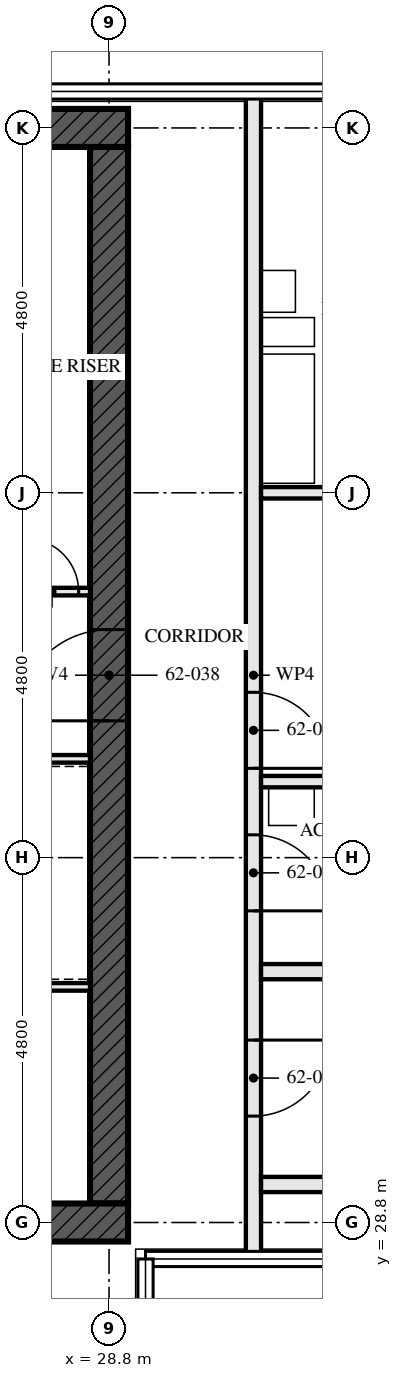
"""IFC4 building model, lengths in metres.
Left out: names, types, materials, properties, quantities, classifications, styles, units other than length and angle.
Written with IfcOpenShell. Run it as: python <this file> out.ifc"""

import sys

from ifc_helpers import new_model, si_unit, direction, frame, frame_2d, origin, place, context, subcontext, project, spatial, rectangle, extrude, element, fill, save


model = new_model("IFC4")
c1 = context("Model", 3, precision=1e-05, world=origin(), true_north=direction((0.0, 1.0)))
c2 = subcontext(c1, "Body", "Model", "MODEL_VIEW")
j1 = project(units=[si_unit("LENGTHUNIT", "METRE"), si_unit("PLANEANGLEUNIT", "RADIAN")], contexts=[c1])
p1 = place(None, origin())
s1 = spatial("IfcSite", under=j1, at=p1, CompositionType="ELEMENT")
p2 = place(p1, origin())
s2 = spatial("IfcBuilding", under=s1, at=p2, CompositionType="ELEMENT")
p3 = place(p2, frame((0.0, 0.0, 226.0)))
s3 = spatial("IfcBuildingStorey", under=s2, at=p3, CompositionType="ELEMENT", Elevation=226.0)
p4 = place(p3, frame((14.15, 28.8, -0.17), z_axis=(0.0, 0.0, 1.0), x_axis=(1.0, 0.0, 0.0)))
e1 = element("IfcWall", 1, at=p4, inside=s3, PredefinedType="SHEAR", context=c2, shape_type="SweptSolid", body=[
    extrude(rectangle(XDim=14.9, YDim=0.5, at=frame_2d((7.45, 0.0))), origin(), (0.0, 0.0, 1.0), 3.5),
])
p5 = place(p4, frame((6.85, 0.0, 0.17)))
e2 = element("IfcOpeningElement", 2, at=p5, cuts=e1, PredefinedType="OPENING", context=c2, shape_type="SweptSolid", body=[
    extrude(rectangle(XDim=1.2, YDim=2.1, at=frame_2d((0.6, 1.05))), frame((0.0, 0.26, 0.0), z_axis=(0.0, -1.0, 0.0), x_axis=(1.0, 0.0, 0.0)), (0.0, 0.0, 1.0), 0.521),
])
p6 = place(p3, frame((29.05, 43.2, -0.17), z_axis=(0.0, 0.0, 1.0), x_axis=(-1.0, 0.0, 0.0)))
e3 = element("IfcWall", 3, at=p6, inside=s3, PredefinedType="SHEAR", context=c2, shape_type="SweptSolid", body=[
    extrude(rectangle(XDim=14.9, YDim=0.5, at=frame_2d((7.45, 0.0))), origin(), (0.0, 0.0, 1.0), 3.5),
])
p7 = place(p3, frame((28.8, 29.05, -0.17), z_axis=(0.0, 0.0, 1.0), x_axis=(0.0, 1.0, 0.0)))
e4 = element("IfcWall", 4, at=p7, inside=s3, PredefinedType="SHEAR", context=c2, shape_type="SweptSolid", body=[
    extrude(rectangle(XDim=13.9, YDim=0.5, at=frame_2d((6.95, 0.0))), origin(), (0.0, 0.0, 1.0), 3.5),
])
p8 = place(p7, frame((6.35, 0.0, 0.17)))
e5 = element("IfcOpeningElement", 5, at=p8, cuts=e4, PredefinedType="OPENING", context=c2, shape_type="SweptSolid", body=[
    extrude(rectangle(XDim=1.2, YDim=2.1, at=frame_2d((0.6, 1.05))), frame((0.0, 0.26, 0.0), z_axis=(0.0, -1.0, 0.0), x_axis=(1.0, 0.0, 0.0)), (0.0, 0.0, 1.0), 0.521),
])
for number, where, z_axis, x_axis in (
    (6, (35.5, 29.3, 0.0), (0.0, 0.0, 1.0), (-1.0, 0.0, 0.0)),
    (7, (35.5, 32.1, 0.0), (0.0, 0.0, 1.0), (-1.0, 0.0, 0.0)),
):
    element("IfcWall", number, at=place(p3, frame(where, z_axis=z_axis, x_axis=x_axis)), inside=s3, PredefinedType="SOLIDWALL", context=c2, shape_type="SweptSolid", body=[
        extrude(rectangle(XDim=4.7, YDim=0.2, at=frame_2d((2.35, 0.0))), origin(), (0.0, 0.0, 1.0), 2.99),
    ])
p9 = place(p3, frame((33.8, 34.6, 0.0), z_axis=(0.0, 0.0, 1.0), x_axis=(-1.0, 0.0, 0.0)))
e8 = element("IfcWall", 8, at=p9, inside=s3, PredefinedType="PARTITIONING", context=c2, shape_type="SweptSolid", body=[
    extrude(rectangle(XDim=3.0, YDim=0.15, at=frame_2d((1.5, 0.0))), origin(), (0.0, 0.0, 1.0), 3.33),
])
p10 = place(p3, frame((33.8, 38.4, 0.0), z_axis=(0.0, 0.0, 1.0), x_axis=(-1.0, 0.0, 0.0)))
e9 = element("IfcWall", 9, at=p10, inside=s3, PredefinedType="PARTITIONING", context=c2, shape_type="SweptSolid", body=[
    extrude(rectangle(XDim=3.0, YDim=0.15, at=frame_2d((1.5, 0.0))), origin(), (0.0, 0.0, 1.0), 2.55),
])
p11 = place(p10, frame((1.05, 0.0, 0.0)))
e10 = element("IfcOpeningElement", 10, at=p11, cuts=e9, PredefinedType="OPENING", context=c2, shape_type="SweptSolid", body=[
    extrude(rectangle(XDim=0.9, YDim=2.1, at=frame_2d((0.45, 1.05))), frame((0.0, 0.085, 0.0), z_axis=(0.0, -1.0, 0.0), x_axis=(1.0, 0.0, 0.0)), (0.0, 0.0, 1.0), 0.171),
])
p12 = place(p3, frame((30.7, 28.345, 0.0), z_axis=(0.0, 0.0, 1.0), x_axis=(0.0, 1.0, 0.0)))
e11 = element("IfcWall", 11, at=p12, inside=s3, PredefinedType="PARTITIONING", context=c2, shape_type="SweptSolid", body=[
    extrude(rectangle(XDim=15.31, YDim=0.2, at=frame_2d((7.655, 0.0))), origin(), (0.0, 0.0, 1.0), 2.32),
])
p13 = place(p12, frame((1.855, 0.0, 0.0)))
e12 = element("IfcOpeningElement", 12, at=p13, cuts=e11, PredefinedType="OPENING", context=c2, shape_type="SweptSolid", body=[
    extrude(rectangle(XDim=1.0, YDim=2.1, at=frame_2d((0.5, 1.05))), frame((0.0, 0.111, 0.0), z_axis=(0.0, -1.0, 0.0), x_axis=(1.0, 0.0, 0.0)), (0.0, 0.0, 1.0), 0.221),
])
p14 = place(p12, frame((4.555, 0.0, 0.0)))
e13 = element("IfcOpeningElement", 13, at=p14, cuts=e11, PredefinedType="OPENING", context=c2, shape_type="SweptSolid", body=[
    extrude(rectangle(XDim=1.0, YDim=2.1, at=frame_2d((0.5, 1.05))), frame((0.0, 0.111, 0.0), z_axis=(0.0, -1.0, 0.0), x_axis=(1.0, 0.0, 0.0)), (0.0, 0.0, 1.0), 0.221),
])
p15 = place(p12, frame((6.43, 0.0, 0.0)))
e14 = element("IfcOpeningElement", 14, at=p15, cuts=e11, PredefinedType="OPENING", context=c2, shape_type="SweptSolid", body=[
    extrude(rectangle(XDim=1.0, YDim=2.1, at=frame_2d((0.5, 1.05))), frame((0.0, 0.111, 0.0), z_axis=(0.0, -1.0, 0.0), x_axis=(1.0, 0.0, 0.0)), (0.0, 0.0, 1.0), 0.221),
])
p16 = place(p3, frame((23.05, 34.9, 0.0), z_axis=(0.0, 0.0, 1.0), x_axis=(1.0, 0.0, 0.0)))
e15 = element("IfcWall", 15, at=p16, inside=s3, PredefinedType="SOLIDWALL", context=c2, shape_type="SweptSolid", body=[
    extrude(rectangle(XDim=5.5, YDim=0.1, at=frame_2d((2.75, 0.0))), origin(), (0.0, 0.0, 1.0), 3.33),
])
p17 = place(p16, frame((0.85, 0.0, 0.0)))
e16 = element("IfcOpeningElement", 16, at=p17, cuts=e15, PredefinedType="OPENING", context=c2, shape_type="SweptSolid", body=[
    extrude(rectangle(XDim=1.0, YDim=2.1, at=frame_2d((0.5, 1.05))), frame((0.0, 0.061, 0.0), z_axis=(0.0, -1.0, 0.0), x_axis=(1.0, 0.0, 0.0)), (0.0, 0.0, 1.0), 0.121),
])
p18 = place(p16, frame((3.625, 0.0, 0.0)))
e17 = element("IfcOpeningElement", 17, at=p18, cuts=e15, PredefinedType="OPENING", context=c2, shape_type="SweptSolid", body=[
    extrude(rectangle(XDim=1.0, YDim=2.1, at=frame_2d((0.5, 1.05))), frame((0.0, 0.061, 0.0), z_axis=(0.0, -1.0, 0.0), x_axis=(1.0, 0.0, 0.0)), (0.0, 0.0, 1.0), 0.121),
])
p19 = place(p3, frame((22.65, 37.1, 0.0), z_axis=(0.0, 0.0, 1.0), x_axis=(1.0, 0.0, 0.0)))
e18 = element("IfcWall", 18, at=p19, inside=s3, PredefinedType="SOLIDWALL", context=c2, shape_type="SweptSolid", body=[
    extrude(rectangle(XDim=5.9, YDim=0.1, at=frame_2d((2.95, 0.0))), origin(), (0.0, 0.0, 1.0), 3.33),
])
p20 = place(p19, frame((3.5, 0.0, 0.0)))
e19 = element("IfcOpeningElement", 19, at=p20, cuts=e18, PredefinedType="OPENING", context=c2, shape_type="SweptSolid", body=[
    extrude(rectangle(XDim=0.9, YDim=2.1, at=frame_2d((0.45, 1.05))), frame((0.0, 0.061, 0.0), z_axis=(0.0, -1.0, 0.0), x_axis=(1.0, 0.0, 0.0)), (0.0, 0.0, 1.0), 0.121),
])
p21 = place(p19, frame((5.05, 0.0, 0.0)))
e20 = element("IfcOpeningElement", 20, at=p21, cuts=e18, PredefinedType="OPENING", context=c2, shape_type="SweptSolid", body=[
    extrude(rectangle(XDim=0.7, YDim=2.1, at=frame_2d((0.35, 1.05))), frame((0.0, 0.061, 0.0), z_axis=(0.0, -1.0, 0.0), x_axis=(1.0, 0.0, 0.0)), (0.0, 0.0, 1.0), 0.121),
])
p22 = place(p3, frame((23.15, 31.9, 0.0), z_axis=(0.0, 0.0, 1.0), x_axis=(1.0, 0.0, 0.0)))
e21 = element("IfcWall", 21, at=p22, inside=s3, PredefinedType="SOLIDWALL", context=c2, shape_type="SweptSolid", body=[
    extrude(rectangle(XDim=5.4, YDim=0.1, at=frame_2d((2.7, 0.0))), origin(), (0.0, 0.0, 1.0), 3.33),
])
p23 = place(p13, frame((1.0, 0.0, 0.0), z_axis=(0.0, 0.0, 1.0), x_axis=(-1.0, 0.0, 0.0)))
e22 = element("IfcDoor", 22, at=p23, inside=s3, OperationType="SINGLE_SWING_RIGHT", PredefinedType="DOOR", context=c2, shape_type="SweptSolid", body=[
    extrude(rectangle(XDim=1.0, YDim=2.1, at=frame_2d((0.5, 1.05))), frame((0.0, 0.032, 0.0), z_axis=(0.0, -1.0, 0.0), x_axis=(1.0, 0.0, 0.0)), (0.0, 0.0, 1.0), 0.064),
])
fill(e12, e22)
p24 = place(p14, frame((1.0, 0.0, 0.0), z_axis=(0.0, 0.0, 1.0), x_axis=(-1.0, 0.0, 0.0)))
e23 = element("IfcDoor", 23, at=p24, inside=s3, OperationType="SINGLE_SWING_LEFT", PredefinedType="DOOR", context=c2, shape_type="SweptSolid", body=[
    extrude(rectangle(XDim=1.0, YDim=2.1, at=frame_2d((0.5, 1.05))), frame((0.0, 0.027, 0.0), z_axis=(0.0, -1.0, 0.0), x_axis=(1.0, 0.0, 0.0)), (0.0, 0.0, 1.0), 0.054),
])
fill(e13, e23)
p25 = place(p15, frame((1.0, 0.0, 0.0), z_axis=(0.0, 0.0, 1.0), x_axis=(-1.0, 0.0, 0.0)))
e24 = element("IfcDoor", 24, at=p25, inside=s3, OperationType="SINGLE_SWING_LEFT", PredefinedType="DOOR", context=c2, shape_type="SweptSolid", body=[
    extrude(rectangle(XDim=1.0, YDim=2.1, at=frame_2d((0.5, 1.05))), frame((0.0, 0.027, 0.0), z_axis=(0.0, -1.0, 0.0), x_axis=(1.0, 0.0, 0.0)), (0.0, 0.0, 1.0), 0.054),
])
fill(e14, e24)
p26 = place(p21, origin())
e25 = element("IfcDoor", 25, at=p26, inside=s3, OperationType="SINGLE_SWING_RIGHT", PredefinedType="DOOR", context=c2, shape_type="SweptSolid", body=[
    extrude(rectangle(XDim=0.7, YDim=2.1, at=frame_2d((0.35, 1.05))), frame((0.0, 0.027, 0.0), z_axis=(0.0, -1.0, 0.0), x_axis=(1.0, 0.0, 0.0)), (0.0, 0.0, 1.0), 0.054),
])
fill(e20, e25)
p27 = place(p8, origin())
e26 = element("IfcDoor", 26, at=p27, inside=s3, OperationType="SINGLE_SWING_LEFT", PredefinedType="DOOR", context=c2, shape_type="SweptSolid", body=[
    extrude(rectangle(XDim=1.2, YDim=2.1, at=frame_2d((0.6, 1.05))), frame((0.0, 0.027, 0.0), z_axis=(0.0, -1.0, 0.0), x_axis=(1.0, 0.0, 0.0)), (0.0, 0.0, 1.0), 0.054),
])
fill(e5, e26)
save(model, sys.argv[1])
